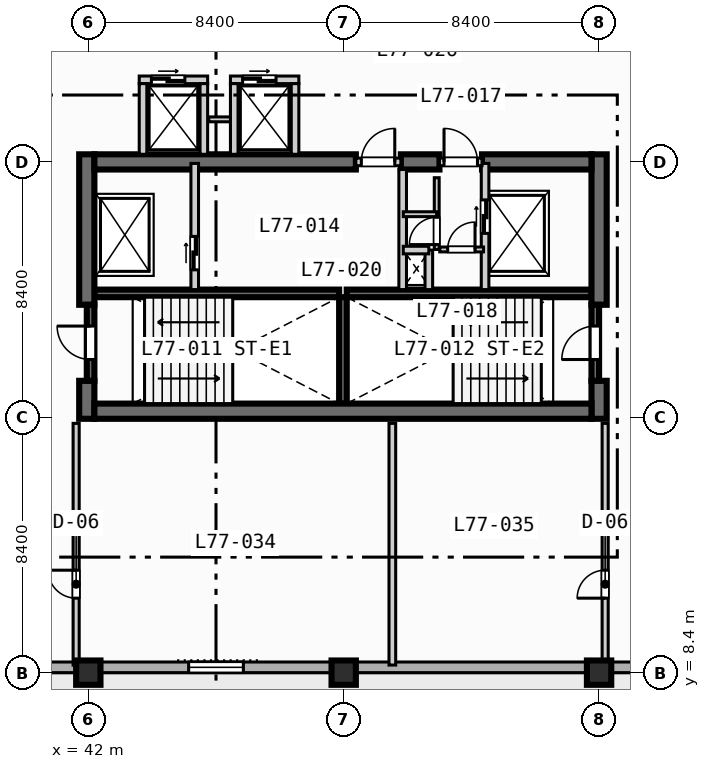
"""IFC4 building model, lengths in metres.
Left out: names, types, materials, properties, quantities, classifications, styles, units other than length and angle.
Written with IfcOpenShell. Run it as: python <this file> out.ifc"""

import sys

from ifc_helpers import new_model, si_unit, direction, frame, frame_2d, origin, origin_2d, place, context, subcontext, project, spatial, rectangle, extrude, element, fill, save


model = new_model("IFC4")
c1 = context("Model", 3, precision=1e-05, world=origin(), true_north=direction((0.0, 1.0)))
c2 = subcontext(c1, "Body", "Model", "MODEL_VIEW")
j1 = project(units=[si_unit("LENGTHUNIT", "METRE"), si_unit("PLANEANGLEUNIT", "RADIAN")], contexts=[c1])
p1 = place(None, origin())
s1 = spatial("IfcSite", under=j1, at=p1, CompositionType="ELEMENT")
p2 = place(p1, origin())
s2 = spatial("IfcBuilding", under=s1, at=p2, CompositionType="ELEMENT")
p3 = place(p2, frame((0.0, 0.0, 312.5)))
s3 = spatial("IfcBuildingStorey", under=s2, at=p3, CompositionType="ELEMENT", Elevation=312.5)
for number, where, z_axis, x_axis in (
    (1, (42.2, 20.875, 0.0), (0.0, 0.0, 1.0), (1.0, 0.0, 0.0)),
    (2, (50.5, 20.875, 0.0), (0.0, 0.0, 1.0), (1.0, 0.0, 0.0)),
):
    element("IfcWall", number, at=place(p3, frame(where, z_axis=z_axis, x_axis=x_axis)), inside=s3, PredefinedType="SOLIDWALL", context=c2, shape_type="SweptSolid", body=[
        extrude(rectangle(XDim=8.05, YDim=0.25, at=frame_2d((4.025, 0.0))), origin(), (0.0, 0.0, 1.0), 3.67),
    ])
p4 = place(p3, frame((50.375, 17.25, 0.0), z_axis=(0.0, 0.0, 1.0), x_axis=(0.0, 1.0, 0.0)))
e3 = element("IfcWall", 3, at=p4, inside=s3, PredefinedType="SOLIDWALL", context=c2, shape_type="SweptSolid", body=[
    extrude(rectangle(XDim=3.5, YDim=0.25, at=frame_2d((1.75, 0.0))), origin(), (0.0, 0.0, 1.0), 3.67),
])
p5 = place(p3, frame((41.95, 16.75, 0.0), z_axis=(0.0, 0.0, 1.0), x_axis=(0.0, 1.0, 0.0)))
e4 = element("IfcWall", 4, at=p5, inside=s3, PredefinedType="SHEAR", context=c2, shape_type="SweptSolid", body=[
    extrude(rectangle(XDim=1.25, YDim=0.5, at=frame_2d((0.625, 0.0))), origin(), (0.0, 0.0, 1.0), 3.67),
])
p6 = place(p3, frame((41.95, 20.5, 0.0), z_axis=(0.0, 0.0, 1.0), x_axis=(0.0, 1.0, 0.0)))
e5 = element("IfcWall", 5, at=p6, inside=s3, PredefinedType="SHEAR", context=c2, shape_type="SweptSolid", body=[
    extrude(rectangle(XDim=4.95, YDim=0.5, at=frame_2d((2.475, 0.0))), origin(), (0.0, 0.0, 1.0), 3.67),
])
p7 = place(p3, frame((58.8, 16.75, 0.0), z_axis=(0.0, 0.0, 1.0), x_axis=(0.0, 1.0, 0.0)))
e6 = element("IfcWall", 6, at=p7, inside=s3, PredefinedType="SHEAR", context=c2, shape_type="SweptSolid", body=[
    extrude(rectangle(XDim=1.25, YDim=0.5, at=frame_2d((0.625, 0.0))), origin(), (0.0, 0.0, 1.0), 3.67),
])
p8 = place(p3, frame((58.8, 20.5, 0.0), z_axis=(0.0, 0.0, 1.0), x_axis=(0.0, 1.0, 0.0)))
e7 = element("IfcWall", 7, at=p8, inside=s3, PredefinedType="SHEAR", context=c2, shape_type="SweptSolid", body=[
    extrude(rectangle(XDim=4.95, YDim=0.5, at=frame_2d((2.475, 0.0))), origin(), (0.0, 0.0, 1.0), 3.67),
])
p9 = place(p3, frame((42.2, 17.0, 0.0), z_axis=(0.0, 0.0, 1.0), x_axis=(1.0, 0.0, 0.0)))
e8 = element("IfcWall", 8, at=p9, inside=s3, PredefinedType="SHEAR", context=c2, shape_type="SweptSolid", body=[
    extrude(rectangle(XDim=16.35, YDim=0.5, at=frame_2d((8.175, 0.0))), origin(), (0.0, 0.0, 1.0), 3.67),
])
p10 = place(p3, frame((42.2, 25.2, 0.0), z_axis=(0.0, 0.0, 1.0), x_axis=(1.0, 0.0, 0.0)))
e9 = element("IfcWall", 9, at=p10, inside=s3, PredefinedType="SHEAR", context=c2, shape_type="SweptSolid", body=[
    extrude(rectangle(XDim=8.6, YDim=0.5, at=frame_2d((4.3, 0.0))), origin(), (0.0, 0.0, 1.0), 3.67),
])
p11 = place(p3, frame((52.28, 25.2, 0.0), z_axis=(0.0, 0.0, 1.0), x_axis=(1.0, 0.0, 0.0)))
e10 = element("IfcWall", 10, at=p11, inside=s3, PredefinedType="SHEAR", context=c2, shape_type="SweptSolid", body=[
    extrude(rectangle(XDim=1.27, YDim=0.5, at=frame_2d((0.635, 0.0))), origin(), (0.0, 0.0, 1.0), 3.67),
])
p12 = place(p3, frame((54.95, 25.2, 0.0), z_axis=(0.0, 0.0, 1.0), x_axis=(1.0, 0.0, 0.0)))
e11 = element("IfcWall", 11, at=p12, inside=s3, PredefinedType="SHEAR", context=c2, shape_type="SweptSolid", body=[
    extrude(rectangle(XDim=3.6, YDim=0.5, at=frame_2d((1.8, 0.0))), origin(), (0.0, 0.0, 1.0), 3.67),
])
for number, where, z_axis, x_axis in (
    (12, (42.0, 8.4, 0.0), (0.0, 0.0, 1.0), (1.0, 0.0, 0.0)),
    (13, (50.4, 8.4, 0.0), (0.0, 0.0, 1.0), (1.0, 0.0, 0.0)),
    (14, (58.8, 8.4, 0.0), (0.0, 0.0, 1.0), (1.0, 0.0, 0.0)),
):
    element("IfcColumn", number, at=place(p3, frame(where, z_axis=z_axis, x_axis=x_axis)), inside=s3, PredefinedType="COLUMN", context=c2, shape_type="SweptSolid", body=[
        extrude(rectangle(XDim=0.8, YDim=0.8, at=origin_2d()), origin(), (0.0, 0.0, 1.0), 3.9),
    ])
p13 = place(p3, frame((64.025, 8.575, 0.0), z_axis=(0.0, 0.0, 1.0), x_axis=(-1.0, 0.0, 0.0)))
e15 = element("IfcWall", 15, at=p13, inside=s3, PredefinedType="STANDARD", context=c2, shape_type="SweptSolid", body=[
    extrude(rectangle(XDim=52.45, YDim=0.35, at=frame_2d((26.225, 0.0))), origin(), (0.0, 0.0, 1.0), 3.67),
])
p14 = place(p13, frame((33.925, 0.0, 0.0)))
e16 = element("IfcOpeningElement", 16, at=p14, cuts=e15, PredefinedType="OPENING", context=c2, shape_type="SweptSolid", body=[
    extrude(rectangle(XDim=1.4, YDim=2.2, at=frame_2d((0.7, 1.1))), frame((0.0, 0.185, 0.0), z_axis=(0.0, -1.0, 0.0), x_axis=(1.0, 0.0, 0.0)), (0.0, 0.0, 1.0), 0.37),
])
p15 = place(p13, frame((41.825, 0.0, 0.85)))
e17 = element("IfcOpeningElement", 17, at=p15, cuts=e15, PredefinedType="OPENING", context=c2, shape_type="SweptSolid", body=[
    extrude(rectangle(XDim=2.4, YDim=1.95, at=frame_2d((1.2, 0.975))), frame((0.0, 0.185, 0.0), z_axis=(0.0, -1.0, 0.0), x_axis=(1.0, 0.0, 0.0)), (0.0, 0.0, 1.0), 0.37),
])
p16 = place(p13, frame((25.025, 0.0, 0.85)))
e18 = element("IfcOpeningElement", 18, at=p16, cuts=e15, PredefinedType="OPENING", context=c2, shape_type="SweptSolid", body=[
    extrude(rectangle(XDim=2.4, YDim=1.95, at=frame_2d((1.2, 0.975))), frame((0.0, 0.185, 0.0), z_axis=(0.0, -1.0, 0.0), x_axis=(1.0, 0.0, 0.0)), (0.0, 0.0, 1.0), 0.37),
])
p17 = place(p13, frame((16.925, 0.0, 0.85)))
e19 = element("IfcOpeningElement", 19, at=p17, cuts=e15, PredefinedType="OPENING", context=c2, shape_type="SweptSolid", body=[
    extrude(rectangle(XDim=1.8, YDim=1.8, at=frame_2d((0.9, 0.9))), frame((0.0, 0.185, 0.0), z_axis=(0.0, -1.0, 0.0), x_axis=(1.0, 0.0, 0.0)), (0.0, 0.0, 1.0), 0.37),
])
p18 = place(p13, frame((50.275, 0.0, 0.85)))
e20 = element("IfcOpeningElement", 20, at=p18, cuts=e15, PredefinedType="OPENING", context=c2, shape_type="SweptSolid", body=[
    extrude(rectangle(XDim=1.8, YDim=1.8, at=frame_2d((0.9, 0.9))), frame((0.0, 0.185, 0.0), z_axis=(0.0, -1.0, 0.0), x_axis=(1.0, 0.0, 0.0)), (0.0, 0.0, 1.0), 0.37),
])
p19 = place(p3, frame((42.075, 18.0, 0.0), z_axis=(0.0, 0.0, 1.0), x_axis=(0.0, 1.0, 0.0)))
e21 = element("IfcWall", 21, at=p19, inside=s3, PredefinedType="SOLIDWALL", context=c2, shape_type="SweptSolid", body=[
    extrude(rectangle(XDim=2.5, YDim=0.25, at=frame_2d((1.25, 0.0))), origin(), (0.0, 0.0, 1.0), 3.67),
])
p20 = place(p19, frame((0.7, 0.0, 0.0)))
e22 = element("IfcOpeningElement", 22, at=p20, cuts=e21, PredefinedType="OPENING", context=c2, shape_type="SweptSolid", body=[
    extrude(rectangle(XDim=1.1, YDim=2.15, at=frame_2d((0.55, 1.075))), frame((0.0, 0.135, 0.0), z_axis=(0.0, -1.0, 0.0), x_axis=(1.0, 0.0, 0.0)), (0.0, 0.0, 1.0), 0.27),
])
p21 = place(p3, frame((58.675, 18.0, 0.0), z_axis=(0.0, 0.0, 1.0), x_axis=(0.0, 1.0, 0.0)))
e23 = element("IfcWall", 23, at=p21, inside=s3, PredefinedType="SOLIDWALL", context=c2, shape_type="SweptSolid", body=[
    extrude(rectangle(XDim=2.5, YDim=0.25, at=frame_2d((1.25, 0.0))), origin(), (0.0, 0.0, 1.0), 3.67),
])
p22 = place(p21, frame((0.7, 0.0, 0.0)))
e24 = element("IfcOpeningElement", 24, at=p22, cuts=e23, PredefinedType="OPENING", context=c2, shape_type="SweptSolid", body=[
    extrude(rectangle(XDim=1.1, YDim=2.15, at=frame_2d((0.55, 1.075))), frame((0.0, 0.135, 0.0), z_axis=(0.0, -1.0, 0.0), x_axis=(1.0, 0.0, 0.0)), (0.0, 0.0, 1.0), 0.27),
])
p23 = place(p3, frame((45.5, 21.0, 0.0), z_axis=(0.0, 0.0, 1.0), x_axis=(0.0, 1.0, 0.0)))
e25 = element("IfcWall", 25, at=p23, inside=s3, PredefinedType="SOLIDWALL", context=c2, shape_type="SweptSolid", body=[
    extrude(rectangle(XDim=4.15, YDim=0.25, at=frame_2d((2.075, 0.0))), origin(), (0.0, 0.0, 1.0), 3.67),
])
p24 = place(p23, frame((0.65, 0.0, 0.0)))
e26 = element("IfcOpeningElement", 26, at=p24, cuts=e25, PredefinedType="OPENING", context=c2, shape_type="SweptSolid", body=[
    extrude(rectangle(XDim=1.1, YDim=2.15, at=frame_2d((0.55, 1.075))), frame((0.0, 0.135, 0.0), z_axis=(0.0, -1.0, 0.0), x_axis=(1.0, 0.0, 0.0)), (0.0, 0.0, 1.0), 0.27),
])
p25 = place(p3, frame((50.8, 25.2, 0.0), z_axis=(0.0, 0.0, 1.0), x_axis=(1.0, 0.0, 0.0)))
e27 = element("IfcWall", 27, at=p25, inside=s3, PredefinedType="SOLIDWALL", context=c2, shape_type="SweptSolid", body=[
    extrude(rectangle(XDim=1.48, YDim=0.25, at=frame_2d((0.74, 0.0))), origin(), (0.0, 0.0, 1.0), 3.67),
])
p26 = place(p25, frame((0.18, 0.0, 0.0)))
e28 = element("IfcOpeningElement", 28, at=p26, cuts=e27, PredefinedType="OPENING", context=c2, shape_type="SweptSolid", body=[
    extrude(rectangle(XDim=1.1, YDim=2.15, at=frame_2d((0.55, 1.075))), frame((0.0, 0.135, 0.0), z_axis=(0.0, -1.0, 0.0), x_axis=(1.0, 0.0, 0.0)), (0.0, 0.0, 1.0), 0.27),
])
p27 = place(p3, frame((52.34, 21.0, 0.0), z_axis=(0.0, 0.0, 1.0), x_axis=(0.0, 1.0, 0.0)))
e29 = element("IfcWall", 29, at=p27, inside=s3, PredefinedType="SOLIDWALL", context=c2, shape_type="SweptSolid", body=[
    extrude(rectangle(XDim=3.95, YDim=0.25, at=frame_2d((1.975, 0.0))), origin(), (0.0, 0.0, 1.0), 3.67),
])
p28 = place(p3, frame((55.05, 21.0, 0.0), z_axis=(0.0, 0.0, 1.0), x_axis=(0.0, 1.0, 0.0)))
e30 = element("IfcWall", 30, at=p28, inside=s3, PredefinedType="SOLIDWALL", context=c2, shape_type="SweptSolid", body=[
    extrude(rectangle(XDim=4.15, YDim=0.25, at=frame_2d((2.075, 0.0))), origin(), (0.0, 0.0, 1.0), 3.67),
])
p29 = place(p28, frame((1.85, 0.0, 0.0)))
e31 = element("IfcOpeningElement", 31, at=p29, cuts=e30, PredefinedType="OPENING", context=c2, shape_type="SweptSolid", body=[
    extrude(rectangle(XDim=1.1, YDim=2.15, at=frame_2d((0.55, 1.075))), frame((0.0, 0.135, 0.0), z_axis=(0.0, -1.0, 0.0), x_axis=(1.0, 0.0, 0.0)), (0.0, 0.0, 1.0), 0.27),
])
p30 = place(p3, frame((53.55, 25.2, 0.0), z_axis=(0.0, 0.0, 1.0), x_axis=(1.0, 0.0, 0.0)))
e32 = element("IfcWall", 32, at=p30, inside=s3, PredefinedType="SOLIDWALL", context=c2, shape_type="SweptSolid", body=[
    extrude(rectangle(XDim=1.4, YDim=0.25, at=frame_2d((0.7, 0.0))), origin(), (0.0, 0.0, 1.0), 3.67),
])
p31 = place(p30, frame((0.15, 0.0, 0.0)))
e33 = element("IfcOpeningElement", 33, at=p31, cuts=e32, PredefinedType="OPENING", context=c2, shape_type="SweptSolid", body=[
    extrude(rectangle(XDim=1.1, YDim=2.15, at=frame_2d((0.55, 1.075))), frame((0.0, 0.135, 0.0), z_axis=(0.0, -1.0, 0.0), x_axis=(1.0, 0.0, 0.0)), (0.0, 0.0, 1.0), 0.27),
])
p32 = place(p3, frame((53.2, 21.0, 0.0), z_axis=(0.0, 0.0, 1.0), x_axis=(0.0, 1.0, 0.0)))
e34 = element("IfcWall", 34, at=p32, inside=s3, PredefinedType="SOLIDWALL", context=c2, shape_type="SweptSolid", body=[
    extrude(rectangle(XDim=1.3, YDim=0.25, at=frame_2d((0.65, 0.0))), origin(), (0.0, 0.0, 1.0), 3.67),
])
p33 = place(p3, frame((52.36, 22.3, 0.0), z_axis=(0.0, 0.0, 1.0), x_axis=(1.0, 0.0, 0.0)))
e35 = element("IfcWall", 35, at=p33, inside=s3, PredefinedType="SOLIDWALL", context=c2, shape_type="SweptSolid", body=[
    extrude(rectangle(XDim=0.84, YDim=0.25, at=frame_2d((0.42, 0.0))), origin(), (0.0, 0.0, 1.0), 3.67),
])
p34 = place(p3, frame((53.56, 22.32, 0.0), z_axis=(0.0, 0.0, 1.0), x_axis=(1.0, 0.0, 0.0)))
e36 = element("IfcWall", 36, at=p34, inside=s3, PredefinedType="PARTITIONING", context=c2, shape_type="SweptSolid", body=[
    extrude(rectangle(XDim=1.44, YDim=0.16, at=frame_2d((0.72, 0.0))), origin(), (0.0, 0.0, 1.0), 3.67),
])
p35 = place(p34, frame((0.26, 0.0, 0.0)))
e37 = element("IfcOpeningElement", 37, at=p35, cuts=e36, PredefinedType="OPENING", context=c2, shape_type="SweptSolid", body=[
    extrude(rectangle(XDim=0.9, YDim=2.1, at=frame_2d((0.45, 1.05))), frame((0.0, 0.09, 0.0), z_axis=(0.0, -1.0, 0.0), x_axis=(1.0, 0.0, 0.0)), (0.0, 0.0, 1.0), 0.18),
])
p36 = place(p3, frame((53.46, 22.32, 0.0), z_axis=(0.0, 0.0, 1.0), x_axis=(0.0, 1.0, 0.0)))
e38 = element("IfcWall", 38, at=p36, inside=s3, PredefinedType="PARTITIONING", context=c2, shape_type="SweptSolid", body=[
    extrude(rectangle(XDim=2.36, YDim=0.16, at=frame_2d((1.18, 0.0))), origin(), (0.0, 0.0, 1.0), 3.67),
])
p37 = place(p36, frame((0.16, 0.0, 0.0)))
e39 = element("IfcOpeningElement", 39, at=p37, cuts=e38, PredefinedType="OPENING", context=c2, shape_type="SweptSolid", body=[
    extrude(rectangle(XDim=0.9, YDim=2.1, at=frame_2d((0.45, 1.05))), frame((0.0, 0.09, 0.0), z_axis=(0.0, -1.0, 0.0), x_axis=(1.0, 0.0, 0.0)), (0.0, 0.0, 1.0), 0.18),
])
p38 = place(p3, frame((52.36, 23.48, 0.0), z_axis=(0.0, 0.0, 1.0), x_axis=(1.0, 0.0, 0.0)))
e40 = element("IfcWall", 40, at=p38, inside=s3, PredefinedType="PARTITIONING", context=c2, shape_type="SweptSolid", body=[
    extrude(rectangle(XDim=1.1, YDim=0.16, at=frame_2d((0.55, 0.0))), origin(), (0.0, 0.0, 1.0), 3.67),
])
p39 = place(p3, frame((43.675, 27.9, 0.0), z_axis=(0.0, 0.0, 1.0), x_axis=(1.0, 0.0, 0.0)))
e41 = element("IfcWall", 41, at=p39, inside=s3, PredefinedType="SOLIDWALL", context=c2, shape_type="SweptSolid", body=[
    extrude(rectangle(XDim=2.25, YDim=0.25, at=frame_2d((1.125, 0.0))), origin(), (0.0, 0.0, 1.0), 3.67),
])
p40 = place(p39, frame((0.4, 0.0, 0.0)))
e42 = element("IfcOpeningElement", 42, at=p40, cuts=e41, PredefinedType="OPENING", context=c2, shape_type="SweptSolid", body=[
    extrude(rectangle(XDim=1.1, YDim=2.15, at=frame_2d((0.55, 1.075))), frame((0.0, 0.135, 0.0), z_axis=(0.0, -1.0, 0.0), x_axis=(1.0, 0.0, 0.0)), (0.0, 0.0, 1.0), 0.27),
])
for number, where, z_axis, x_axis in (
    (43, (43.8, 25.45, 0.0), (0.0, 0.0, 1.0), (0.0, 1.0, 0.0)),
    (44, (45.8, 25.45, 0.0), (0.0, 0.0, 1.0), (0.0, 1.0, 0.0)),
):
    element("IfcWall", number, at=place(p3, frame(where, z_axis=z_axis, x_axis=x_axis)), inside=s3, PredefinedType="SOLIDWALL", context=c2, shape_type="SweptSolid", body=[
        extrude(rectangle(XDim=2.325, YDim=0.25, at=frame_2d((1.163, 0.0))), origin(), (0.0, 0.0, 1.0), 3.67),
    ])
p41 = place(p3, frame((45.96, 26.6, 0.0), z_axis=(0.0, 0.0, 1.0), x_axis=(1.0, 0.0, 0.0)))
e45 = element("IfcWall", 45, at=p41, inside=s3, PredefinedType="PARTITIONING", context=c2, shape_type="SweptSolid", body=[
    extrude(rectangle(XDim=0.88, YDim=0.16, at=frame_2d((0.44, 0.0))), origin(), (0.0, 0.0, 1.0), 3.67),
])
p42 = place(p3, frame((46.675, 27.9, 0.0), z_axis=(0.0, 0.0, 1.0), x_axis=(1.0, 0.0, 0.0)))
e46 = element("IfcWall", 46, at=p42, inside=s3, PredefinedType="SOLIDWALL", context=c2, shape_type="SweptSolid", body=[
    extrude(rectangle(XDim=2.25, YDim=0.25, at=frame_2d((1.125, 0.0))), origin(), (0.0, 0.0, 1.0), 3.67),
])
p43 = place(p42, frame((0.4, 0.0, 0.0)))
e47 = element("IfcOpeningElement", 47, at=p43, cuts=e46, PredefinedType="OPENING", context=c2, shape_type="SweptSolid", body=[
    extrude(rectangle(XDim=1.1, YDim=2.15, at=frame_2d((0.55, 1.075))), frame((0.0, 0.135, 0.0), z_axis=(0.0, -1.0, 0.0), x_axis=(1.0, 0.0, 0.0)), (0.0, 0.0, 1.0), 0.27),
])
for number, where, z_axis, x_axis in (
    (48, (46.8, 25.45, 0.0), (0.0, 0.0, 1.0), (0.0, 1.0, 0.0)),
    (49, (48.8, 25.45, 0.0), (0.0, 0.0, 1.0), (0.0, 1.0, 0.0)),
):
    element("IfcWall", number, at=place(p3, frame(where, z_axis=z_axis, x_axis=x_axis)), inside=s3, PredefinedType="SOLIDWALL", context=c2, shape_type="SweptSolid", body=[
        extrude(rectangle(XDim=2.325, YDim=0.25, at=frame_2d((1.163, 0.0))), origin(), (0.0, 0.0, 1.0), 3.67),
    ])
p44 = place(p3, frame((41.6, 8.65, 0.0), z_axis=(0.0, 0.0, 1.0), x_axis=(0.0, 1.0, 0.0)))
e50 = element("IfcWall", 50, at=p44, inside=s3, PredefinedType="PARTITIONING", context=c2, shape_type="SweptSolid", body=[
    extrude(rectangle(XDim=7.95, YDim=0.2, at=frame_2d((3.975, 0.0))), origin(), (0.0, 0.0, 1.0), 3.67),
])
p45 = place(p44, frame((2.2, 0.0, 0.0)))
e51 = element("IfcOpeningElement", 51, at=p45, cuts=e50, PredefinedType="OPENING", context=c2, shape_type="SweptSolid", body=[
    extrude(rectangle(XDim=0.92, YDim=2.1, at=frame_2d((0.46, 1.05))), frame((0.0, 0.11, 0.0), z_axis=(0.0, -1.0, 0.0), x_axis=(1.0, 0.0, 0.0)), (0.0, 0.0, 1.0), 0.22),
])
p46 = place(p3, frame((59.0, 8.65, 0.0), z_axis=(0.0, 0.0, 1.0), x_axis=(0.0, 1.0, 0.0)))
e52 = element("IfcWall", 52, at=p46, inside=s3, PredefinedType="PARTITIONING", context=c2, shape_type="SweptSolid", body=[
    extrude(rectangle(XDim=7.95, YDim=0.2, at=frame_2d((3.975, 0.0))), origin(), (0.0, 0.0, 1.0), 3.07),
])
p47 = place(p46, frame((2.2, 0.0, 0.0)))
e53 = element("IfcOpeningElement", 53, at=p47, cuts=e52, PredefinedType="OPENING", context=c2, shape_type="SweptSolid", body=[
    extrude(rectangle(XDim=0.92, YDim=2.1, at=frame_2d((0.46, 1.05))), frame((0.0, 0.11, 0.0), z_axis=(0.0, -1.0, 0.0), x_axis=(1.0, 0.0, 0.0)), (0.0, 0.0, 1.0), 0.22),
])
p48 = place(p3, frame((52.0, 8.65, 0.0), z_axis=(0.0, 0.0, 1.0), x_axis=(0.0, 1.0, 0.0)))
e54 = element("IfcWall", 54, at=p48, inside=s3, PredefinedType="PARTITIONING", context=c2, shape_type="SweptSolid", body=[
    extrude(rectangle(XDim=7.95, YDim=0.22, at=frame_2d((3.975, 0.0))), origin(), (0.0, 0.0, 1.0), 3.67),
])
p49 = place(p17, origin())
e55 = element("IfcWindow", 55, at=p49, inside=s3, PartitioningType="SINGLE_PANEL", PredefinedType="WINDOW", context=c2, shape_type="SweptSolid", body=[
    extrude(rectangle(XDim=1.8, YDim=1.8, at=frame_2d((0.9, 0.9))), frame((0.0, 0.03, 0.0), z_axis=(0.0, -1.0, 0.0), x_axis=(1.0, 0.0, 0.0)), (0.0, 0.0, 1.0), 0.06),
])
fill(e19, e55)
p50 = place(p20, origin())
e56 = element("IfcDoor", 56, at=p50, inside=s3, OperationType="SINGLE_SWING_RIGHT", PredefinedType="DOOR", context=c2, shape_type="SweptSolid", body=[
    extrude(rectangle(XDim=1.1, YDim=2.15, at=frame_2d((0.55, 1.075))), frame((0.0, 0.025, 0.0), z_axis=(0.0, -1.0, 0.0), x_axis=(1.0, 0.0, 0.0)), (0.0, 0.0, 1.0), 0.05),
])
fill(e22, e56)
p51 = place(p22, origin())
e57 = element("IfcDoor", 57, at=p51, inside=s3, OperationType="SINGLE_SWING_LEFT", PredefinedType="DOOR", context=c2, shape_type="SweptSolid", body=[
    extrude(rectangle(XDim=1.1, YDim=2.15, at=frame_2d((0.55, 1.075))), frame((0.0, 0.025, 0.0), z_axis=(0.0, -1.0, 0.0), x_axis=(1.0, 0.0, 0.0)), (0.0, 0.0, 1.0), 0.05),
])
fill(e24, e57)
p52 = place(p24, origin())
e58 = element("IfcDoor", 58, at=p52, inside=s3, OperationType="SLIDING_TO_LEFT", PredefinedType="DOOR", context=c2, shape_type="SweptSolid", body=[
    extrude(rectangle(XDim=1.1, YDim=2.15, at=frame_2d((0.55, 1.075))), frame((0.0, 0.025, 0.0), z_axis=(0.0, -1.0, 0.0), x_axis=(1.0, 0.0, 0.0)), (0.0, 0.0, 1.0), 0.05),
])
fill(e26, e58)
p53 = place(p26, origin())
e59 = element("IfcDoor", 59, at=p53, inside=s3, OperationType="SINGLE_SWING_RIGHT", PredefinedType="DOOR", context=c2, shape_type="SweptSolid", body=[
    extrude(rectangle(XDim=1.1, YDim=2.15, at=frame_2d((0.55, 1.075))), frame((0.0, 0.025, 0.0), z_axis=(0.0, -1.0, 0.0), x_axis=(1.0, 0.0, 0.0)), (0.0, 0.0, 1.0), 0.05),
])
fill(e28, e59)
p54 = place(p29, origin())
e60 = element("IfcDoor", 60, at=p54, inside=s3, OperationType="SLIDING_TO_LEFT", PredefinedType="DOOR", context=c2, shape_type="SweptSolid", body=[
    extrude(rectangle(XDim=1.1, YDim=2.15, at=frame_2d((0.55, 1.075))), frame((0.0, 0.025, 0.0), z_axis=(0.0, -1.0, 0.0), x_axis=(1.0, 0.0, 0.0)), (0.0, 0.0, 1.0), 0.05),
])
fill(e31, e60)
p55 = place(p31, origin())
e61 = element("IfcDoor", 61, at=p55, inside=s3, OperationType="SINGLE_SWING_LEFT", PredefinedType="DOOR", context=c2, shape_type="SweptSolid", body=[
    extrude(rectangle(XDim=1.1, YDim=2.15, at=frame_2d((0.55, 1.075))), frame((0.0, 0.025, 0.0), z_axis=(0.0, -1.0, 0.0), x_axis=(1.0, 0.0, 0.0)), (0.0, 0.0, 1.0), 0.05),
])
fill(e33, e61)
p56 = place(p35, origin())
e62 = element("IfcDoor", 62, at=p56, inside=s3, OperationType="SINGLE_SWING_RIGHT", PredefinedType="DOOR", context=c2, shape_type="SweptSolid", body=[
    extrude(rectangle(XDim=0.9, YDim=2.1, at=frame_2d((0.45, 1.05))), frame((0.0, 0.025, 0.0), z_axis=(0.0, -1.0, 0.0), x_axis=(1.0, 0.0, 0.0)), (0.0, 0.0, 1.0), 0.05),
])
fill(e37, e62)
p57 = place(p37, origin())
e63 = element("IfcDoor", 63, at=p57, inside=s3, OperationType="SINGLE_SWING_LEFT", PredefinedType="DOOR", context=c2, shape_type="SweptSolid", body=[
    extrude(rectangle(XDim=0.9, YDim=2.1, at=frame_2d((0.45, 1.05))), frame((0.0, 0.025, 0.0), z_axis=(0.0, -1.0, 0.0), x_axis=(1.0, 0.0, 0.0)), (0.0, 0.0, 1.0), 0.05),
])
fill(e39, e63)
p58 = place(p40, origin())
e64 = element("IfcDoor", 64, at=p58, inside=s3, OperationType="SLIDING_TO_LEFT", PredefinedType="DOOR", context=c2, shape_type="SweptSolid", body=[
    extrude(rectangle(XDim=1.1, YDim=2.15, at=frame_2d((0.55, 1.075))), frame((0.0, 0.025, 0.0), z_axis=(0.0, -1.0, 0.0), x_axis=(1.0, 0.0, 0.0)), (0.0, 0.0, 1.0), 0.05),
])
fill(e42, e64)
p59 = place(p43, origin())
e65 = element("IfcDoor", 65, at=p59, inside=s3, OperationType="SLIDING_TO_LEFT", PredefinedType="DOOR", context=c2, shape_type="SweptSolid", body=[
    extrude(rectangle(XDim=1.1, YDim=2.15, at=frame_2d((0.55, 1.075))), frame((0.0, 0.025, 0.0), z_axis=(0.0, -1.0, 0.0), x_axis=(1.0, 0.0, 0.0)), (0.0, 0.0, 1.0), 0.05),
])
fill(e47, e65)
p60 = place(p45, origin())
e66 = element("IfcDoor", 66, at=p60, inside=s3, OperationType="SINGLE_SWING_RIGHT", PredefinedType="DOOR", context=c2, shape_type="SweptSolid", body=[
    extrude(rectangle(XDim=0.92, YDim=2.1, at=frame_2d((0.46, 1.05))), frame((0.0, 0.025, 0.0), z_axis=(0.0, -1.0, 0.0), x_axis=(1.0, 0.0, 0.0)), (0.0, 0.0, 1.0), 0.05),
])
fill(e51, e66)
p61 = place(p47, origin())
e67 = element("IfcDoor", 67, at=p61, inside=s3, OperationType="SINGLE_SWING_LEFT", PredefinedType="DOOR", context=c2, shape_type="SweptSolid", body=[
    extrude(rectangle(XDim=0.92, YDim=2.1, at=frame_2d((0.46, 1.05))), frame((0.0, 0.025, 0.0), z_axis=(0.0, -1.0, 0.0), x_axis=(1.0, 0.0, 0.0)), (0.0, 0.0, 1.0), 0.05),
])
fill(e53, e67)
save(model, sys.argv[1])
